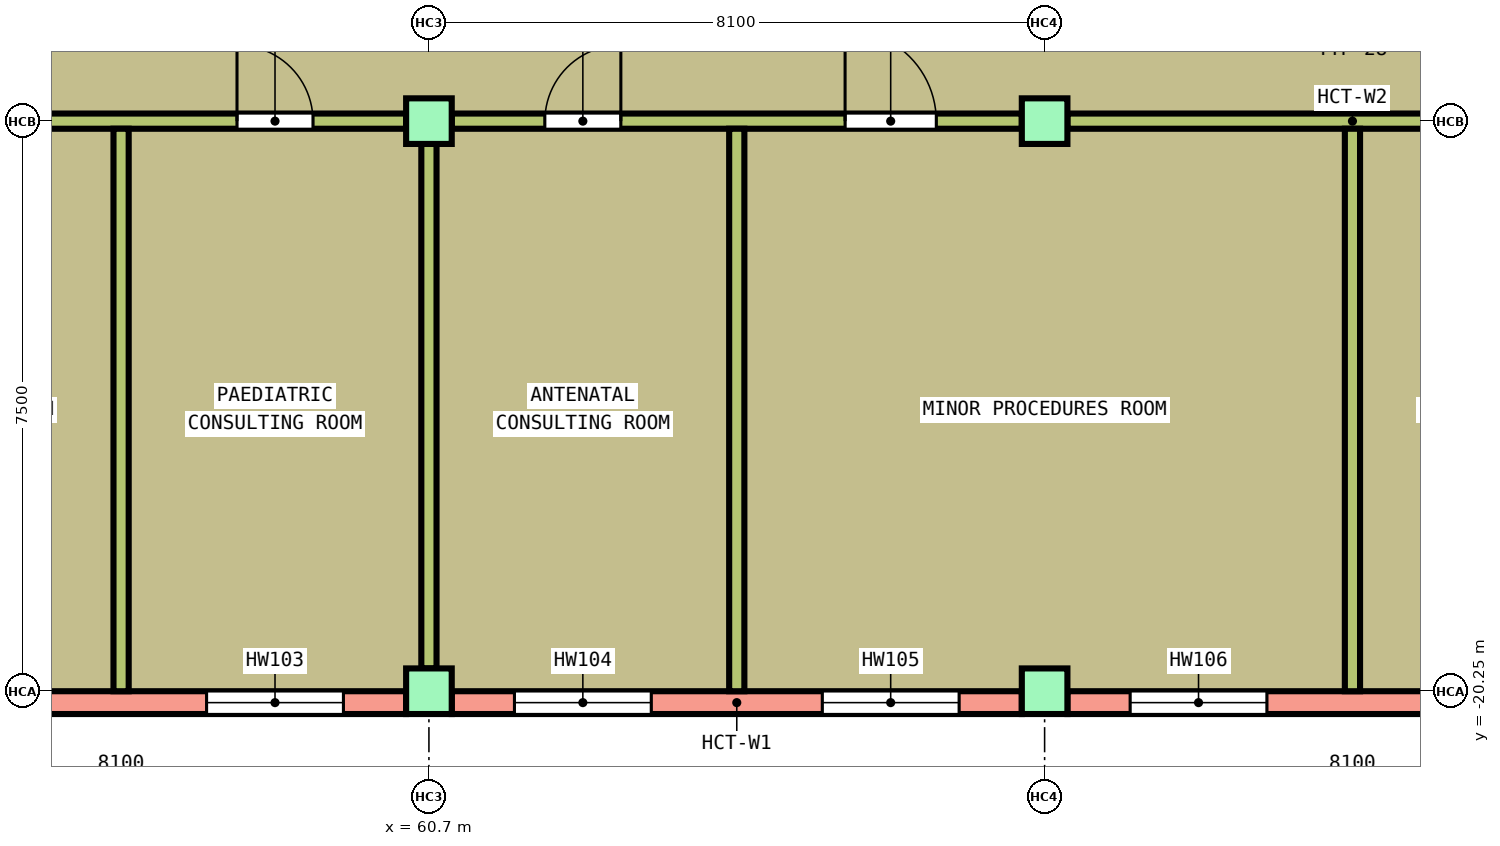
"""IFC4 building model, lengths in metres.
Left out: names, types, materials, properties, quantities, classifications, styles, units other than length and angle.
Written with IfcOpenShell. Run it as: python <this file> out.ifc"""

import sys

from ifc_helpers import new_model, si_unit, direction, frame, frame_2d, origin, origin_2d, place, context, subcontext, project, spatial, rectangle, extrude, element, fill, save


model = new_model("IFC4")
c1 = context("Model", 3, precision=1e-05, world=origin(), true_north=direction((0.0, 1.0)))
c2 = subcontext(c1, "Body", "Model", "MODEL_VIEW")
j1 = project(units=[si_unit("LENGTHUNIT", "METRE"), si_unit("PLANEANGLEUNIT", "RADIAN")], contexts=[c1])
p1 = place(None, origin())
s1 = spatial("IfcSite", under=j1, at=p1, CompositionType="ELEMENT")
p2 = place(p1, origin())
s2 = spatial("IfcBuilding", under=s1, at=p2, CompositionType="ELEMENT")
p3 = place(p2, frame((0.0, 0.0, 5.6)))
s3 = spatial("IfcBuildingStorey", under=s2, at=p3, CompositionType="ELEMENT", Elevation=5.6)
for number, where, z_axis, x_axis in (
    (1, (60.7, -20.25, 0.0), (0.0, 0.0, 1.0), (1.0, 0.0, 0.0)),
    (2, (68.8, -20.25, 0.0), (0.0, 0.0, 1.0), (1.0, 0.0, 0.0)),
    (3, (60.7, -12.75, 0.0), (0.0, 0.0, 1.0), (1.0, 0.0, 0.0)),
    (4, (68.8, -12.75, 0.0), (0.0, 0.0, 1.0), (1.0, 0.0, 0.0)),
):
    element("IfcColumn", number, at=place(p3, frame(where, z_axis=z_axis, x_axis=x_axis)), inside=s3, PredefinedType="COLUMN", context=c2, shape_type="SweptSolid", body=[
        extrude(rectangle(XDim=0.6, YDim=0.6, at=origin_2d()), origin(), (0.0, 0.0, 1.0), 4.6),
    ])
p4 = place(p3, frame((52.9, -20.4, 0.0), z_axis=(0.0, 0.0, 1.0), x_axis=(1.0, 0.0, 0.0)))
e5 = element("IfcWall", 5, at=p4, inside=s3, PredefinedType="SOLIDWALL", context=c2, shape_type="SweptSolid", body=[
    extrude(rectangle(XDim=7.5, YDim=0.3, at=frame_2d((3.75, 0.0))), origin(), (0.0, 0.0, 1.0), 3.8),
])
p5 = place(p4, frame((0.825, 0.0, 0.9)))
e6 = element("IfcOpeningElement", 6, at=p5, cuts=e5, PredefinedType="OPENING", context=c2, shape_type="SweptSolid", body=[
    extrude(rectangle(XDim=1.8, YDim=1.8, at=frame_2d((0.9, 0.9))), frame((0.0, 0.16, 0.0), z_axis=(0.0, -1.0, 0.0), x_axis=(1.0, 0.0, 0.0)), (0.0, 0.0, 1.0), 0.32),
])
p6 = place(p4, frame((4.875, 0.0, 0.9)))
e7 = element("IfcOpeningElement", 7, at=p6, cuts=e5, PredefinedType="OPENING", context=c2, shape_type="SweptSolid", body=[
    extrude(rectangle(XDim=1.8, YDim=1.8, at=frame_2d((0.9, 0.9))), frame((0.0, 0.16, 0.0), z_axis=(0.0, -1.0, 0.0), x_axis=(1.0, 0.0, 0.0)), (0.0, 0.0, 1.0), 0.32),
])
p7 = place(p3, frame((61.0, -20.4, 0.0), z_axis=(0.0, 0.0, 1.0), x_axis=(1.0, 0.0, 0.0)))
e8 = element("IfcWall", 8, at=p7, inside=s3, PredefinedType="SOLIDWALL", context=c2, shape_type="SweptSolid", body=[
    extrude(rectangle(XDim=7.5, YDim=0.3, at=frame_2d((3.75, 0.0))), origin(), (0.0, 0.0, 1.0), 3.8),
])
p8 = place(p7, frame((0.825, 0.0, 0.9)))
e9 = element("IfcOpeningElement", 9, at=p8, cuts=e8, PredefinedType="OPENING", context=c2, shape_type="SweptSolid", body=[
    extrude(rectangle(XDim=1.8, YDim=1.8, at=frame_2d((0.9, 0.9))), frame((0.0, 0.16, 0.0), z_axis=(0.0, -1.0, 0.0), x_axis=(1.0, 0.0, 0.0)), (0.0, 0.0, 1.0), 0.32),
])
p9 = place(p7, frame((4.875, 0.0, 0.9)))
e10 = element("IfcOpeningElement", 10, at=p9, cuts=e8, PredefinedType="OPENING", context=c2, shape_type="SweptSolid", body=[
    extrude(rectangle(XDim=1.8, YDim=1.8, at=frame_2d((0.9, 0.9))), frame((0.0, 0.16, 0.0), z_axis=(0.0, -1.0, 0.0), x_axis=(1.0, 0.0, 0.0)), (0.0, 0.0, 1.0), 0.32),
])
p10 = place(p3, frame((69.1, -20.4, 0.0), z_axis=(0.0, 0.0, 1.0), x_axis=(1.0, 0.0, 0.0)))
e11 = element("IfcWall", 11, at=p10, inside=s3, PredefinedType="SOLIDWALL", context=c2, shape_type="SweptSolid", body=[
    extrude(rectangle(XDim=7.5, YDim=0.3, at=frame_2d((3.75, 0.0))), origin(), (0.0, 0.0, 1.0), 3.8),
])
p11 = place(p10, frame((0.825, 0.0, 0.9)))
e12 = element("IfcOpeningElement", 12, at=p11, cuts=e11, PredefinedType="OPENING", context=c2, shape_type="SweptSolid", body=[
    extrude(rectangle(XDim=1.8, YDim=1.8, at=frame_2d((0.9, 0.9))), frame((0.0, 0.16, 0.0), z_axis=(0.0, -1.0, 0.0), x_axis=(1.0, 0.0, 0.0)), (0.0, 0.0, 1.0), 0.32),
])
p12 = place(p10, frame((4.875, 0.0, 0.9)))
e13 = element("IfcOpeningElement", 13, at=p12, cuts=e11, PredefinedType="OPENING", context=c2, shape_type="SweptSolid", body=[
    extrude(rectangle(XDim=1.8, YDim=1.8, at=frame_2d((0.9, 0.9))), frame((0.0, 0.16, 0.0), z_axis=(0.0, -1.0, 0.0), x_axis=(1.0, 0.0, 0.0)), (0.0, 0.0, 1.0), 0.32),
])
p13 = place(p3, frame((52.9, -12.75, 0.0), z_axis=(0.0, 0.0, 1.0), x_axis=(1.0, 0.0, 0.0)))
e14 = element("IfcWall", 14, at=p13, inside=s3, PredefinedType="PARTITIONING", context=c2, shape_type="SweptSolid", body=[
    extrude(rectangle(XDim=7.5, YDim=0.2, at=frame_2d((3.75, 0.0))), origin(), (0.0, 0.0, 1.0), 3.8),
])
p14 = place(p13, frame((1.225, 0.0, 0.0)))
e15 = element("IfcOpeningElement", 15, at=p14, cuts=e14, PredefinedType="OPENING", context=c2, shape_type="SweptSolid", body=[
    extrude(rectangle(XDim=1.0, YDim=2.1, at=frame_2d((0.5, 1.05))), frame((0.0, 0.11, 0.0), z_axis=(0.0, -1.0, 0.0), x_axis=(1.0, 0.0, 0.0)), (0.0, 0.0, 1.0), 0.22),
])
p15 = place(p13, frame((5.275, 0.0, 0.0)))
e16 = element("IfcOpeningElement", 16, at=p15, cuts=e14, PredefinedType="OPENING", context=c2, shape_type="SweptSolid", body=[
    extrude(rectangle(XDim=1.0, YDim=2.1, at=frame_2d((0.5, 1.05))), frame((0.0, 0.11, 0.0), z_axis=(0.0, -1.0, 0.0), x_axis=(1.0, 0.0, 0.0)), (0.0, 0.0, 1.0), 0.22),
])
p16 = place(p3, frame((61.0, -12.75, 0.0), z_axis=(0.0, 0.0, 1.0), x_axis=(1.0, 0.0, 0.0)))
e17 = element("IfcWall", 17, at=p16, inside=s3, PredefinedType="PARTITIONING", context=c2, shape_type="SweptSolid", body=[
    extrude(rectangle(XDim=7.5, YDim=0.2, at=frame_2d((3.75, 0.0))), origin(), (0.0, 0.0, 1.0), 3.8),
])
p17 = place(p16, frame((1.225, 0.0, 0.0)))
e18 = element("IfcOpeningElement", 18, at=p17, cuts=e17, PredefinedType="OPENING", context=c2, shape_type="SweptSolid", body=[
    extrude(rectangle(XDim=1.0, YDim=2.1, at=frame_2d((0.5, 1.05))), frame((0.0, 0.11, 0.0), z_axis=(0.0, -1.0, 0.0), x_axis=(1.0, 0.0, 0.0)), (0.0, 0.0, 1.0), 0.22),
])
p18 = place(p16, frame((5.175, 0.0, 0.0)))
e19 = element("IfcOpeningElement", 19, at=p18, cuts=e17, PredefinedType="OPENING", context=c2, shape_type="SweptSolid", body=[
    extrude(rectangle(XDim=1.2, YDim=2.1, at=frame_2d((0.6, 1.05))), frame((0.0, 0.11, 0.0), z_axis=(0.0, -1.0, 0.0), x_axis=(1.0, 0.0, 0.0)), (0.0, 0.0, 1.0), 0.22),
])
p19 = place(p3, frame((69.1, -12.75, 0.0), z_axis=(0.0, 0.0, 1.0), x_axis=(1.0, 0.0, 0.0)))
e20 = element("IfcWall", 20, at=p19, inside=s3, PredefinedType="PARTITIONING", context=c2, shape_type="SweptSolid", body=[
    extrude(rectangle(XDim=7.5, YDim=0.2, at=frame_2d((3.75, 0.0))), origin(), (0.0, 0.0, 1.0), 3.8),
])
p20 = place(p19, frame((5.275, 0.0, 0.0)))
e21 = element("IfcOpeningElement", 21, at=p20, cuts=e20, PredefinedType="OPENING", context=c2, shape_type="SweptSolid", body=[
    extrude(rectangle(XDim=1.0, YDim=2.1, at=frame_2d((0.5, 1.05))), frame((0.0, 0.11, 0.0), z_axis=(0.0, -1.0, 0.0), x_axis=(1.0, 0.0, 0.0)), (0.0, 0.0, 1.0), 0.22),
])
p21 = place(p3, frame((56.65, -20.25, 0.0), z_axis=(0.0, 0.0, 1.0), x_axis=(0.0, 1.0, 0.0)))
e22 = element("IfcWall", 22, at=p21, inside=s3, PredefinedType="PARTITIONING", context=c2, shape_type="SweptSolid", body=[
    extrude(rectangle(XDim=7.4, YDim=0.2, at=frame_2d((3.7, 0.0))), origin(), (0.0, 0.0, 1.0), 3.8),
])
p22 = place(p3, frame((60.7, -19.95, 0.0), z_axis=(0.0, 0.0, 1.0), x_axis=(0.0, 1.0, 0.0)))
e23 = element("IfcWall", 23, at=p22, inside=s3, PredefinedType="PARTITIONING", context=c2, shape_type="SweptSolid", body=[
    extrude(rectangle(XDim=6.9, YDim=0.2, at=frame_2d((3.45, 0.0))), origin(), (0.0, 0.0, 1.0), 3.8),
])
for number, where, z_axis, x_axis in (
    (24, (64.75, -20.25, 0.0), (0.0, 0.0, 1.0), (0.0, 1.0, 0.0)),
    (25, (72.85, -20.25, 0.0), (0.0, 0.0, 1.0), (0.0, 1.0, 0.0)),
):
    element("IfcWall", number, at=place(p3, frame(where, z_axis=z_axis, x_axis=x_axis)), inside=s3, PredefinedType="PARTITIONING", context=c2, shape_type="SweptSolid", body=[
        extrude(rectangle(XDim=7.4, YDim=0.2, at=frame_2d((3.7, 0.0))), origin(), (0.0, 0.0, 1.0), 3.8),
    ])
p23 = place(p15, origin())
e26 = element("IfcDoor", 26, at=p23, inside=s3, OperationType="SINGLE_SWING_LEFT", PredefinedType="DOOR", context=c2, shape_type="SweptSolid", body=[
    extrude(rectangle(XDim=1.0, YDim=2.1, at=frame_2d((0.5, 1.05))), frame((0.0, 0.025, 0.0), z_axis=(0.0, -1.0, 0.0), x_axis=(1.0, 0.0, 0.0)), (0.0, 0.0, 1.0), 0.05),
])
fill(e16, e26)
p24 = place(p17, origin())
e27 = element("IfcDoor", 27, at=p24, inside=s3, OperationType="SINGLE_SWING_RIGHT", PredefinedType="DOOR", context=c2, shape_type="SweptSolid", body=[
    extrude(rectangle(XDim=1.0, YDim=2.1, at=frame_2d((0.5, 1.05))), frame((0.0, 0.025, 0.0), z_axis=(0.0, -1.0, 0.0), x_axis=(1.0, 0.0, 0.0)), (0.0, 0.0, 1.0), 0.05),
])
fill(e18, e27)
p25 = place(p18, origin())
e28 = element("IfcDoor", 28, at=p25, inside=s3, OperationType="SINGLE_SWING_LEFT", PredefinedType="DOOR", context=c2, shape_type="SweptSolid", body=[
    extrude(rectangle(XDim=1.2, YDim=2.1, at=frame_2d((0.6, 1.05))), frame((0.0, 0.025, 0.0), z_axis=(0.0, -1.0, 0.0), x_axis=(1.0, 0.0, 0.0)), (0.0, 0.0, 1.0), 0.05),
])
fill(e19, e28)
p26 = place(p6, origin())
e29 = element("IfcWindow", 29, at=p26, inside=s3, PartitioningType="SINGLE_PANEL", PredefinedType="WINDOW", context=c2, shape_type="SweptSolid", body=[
    extrude(rectangle(XDim=1.8, YDim=1.8, at=frame_2d((0.9, 0.9))), frame((0.0, 0.03, 0.0), z_axis=(0.0, -1.0, 0.0), x_axis=(1.0, 0.0, 0.0)), (0.0, 0.0, 1.0), 0.06),
])
fill(e7, e29)
p27 = place(p8, origin())
e30 = element("IfcWindow", 30, at=p27, inside=s3, PartitioningType="SINGLE_PANEL", PredefinedType="WINDOW", context=c2, shape_type="SweptSolid", body=[
    extrude(rectangle(XDim=1.8, YDim=1.8, at=frame_2d((0.9, 0.9))), frame((0.0, 0.03, 0.0), z_axis=(0.0, -1.0, 0.0), x_axis=(1.0, 0.0, 0.0)), (0.0, 0.0, 1.0), 0.06),
])
fill(e9, e30)
p28 = place(p9, origin())
e31 = element("IfcWindow", 31, at=p28, inside=s3, PartitioningType="SINGLE_PANEL", PredefinedType="WINDOW", context=c2, shape_type="SweptSolid", body=[
    extrude(rectangle(XDim=1.8, YDim=1.8, at=frame_2d((0.9, 0.9))), frame((0.0, 0.03, 0.0), z_axis=(0.0, -1.0, 0.0), x_axis=(1.0, 0.0, 0.0)), (0.0, 0.0, 1.0), 0.06),
])
fill(e10, e31)
p29 = place(p11, origin())
e32 = element("IfcWindow", 32, at=p29, inside=s3, PartitioningType="SINGLE_PANEL", PredefinedType="WINDOW", context=c2, shape_type="SweptSolid", body=[
    extrude(rectangle(XDim=1.8, YDim=1.8, at=frame_2d((0.9, 0.9))), frame((0.0, 0.03, 0.0), z_axis=(0.0, -1.0, 0.0), x_axis=(1.0, 0.0, 0.0)), (0.0, 0.0, 1.0), 0.06),
])
fill(e12, e32)
save(model, sys.argv[1])
